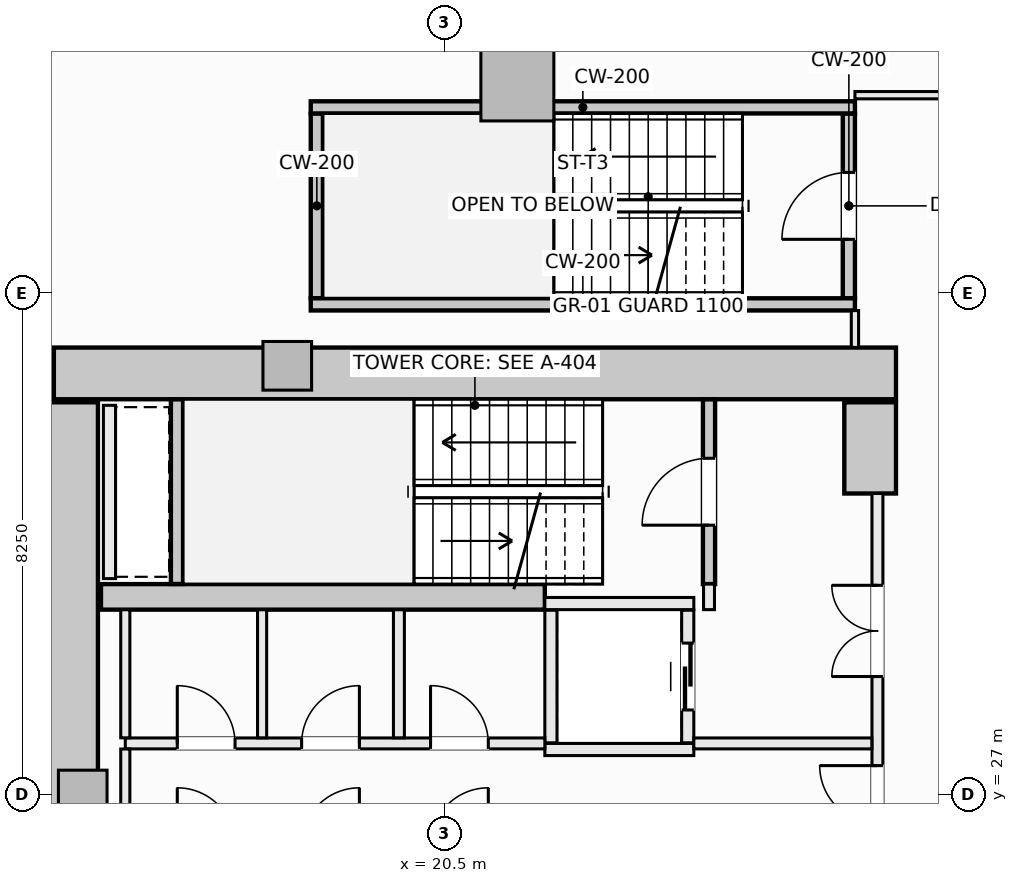
"""IFC4 building model, lengths in metres.
Left out: names, types, materials, properties, quantities, classifications, styles, units other than length and angle.
Written with IfcOpenShell. Run it as: python <this file> out.ifc"""

import sys

from ifc_helpers import new_model, si_unit, direction, frame, frame_2d, origin, origin_2d, place, context, subcontext, project, spatial, rectangle, extrude, element, fill, save


model = new_model("IFC4")
c1 = context("Model", 3, precision=1e-05, world=origin(), true_north=direction((0.0, 1.0)))
c2 = subcontext(c1, "Body", "Model", "MODEL_VIEW")
j1 = project(units=[si_unit("LENGTHUNIT", "METRE"), si_unit("PLANEANGLEUNIT", "RADIAN")], contexts=[c1])
p1 = place(None, origin())
s1 = spatial("IfcSite", under=j1, at=p1, CompositionType="ELEMENT")
p2 = place(p1, origin())
s2 = spatial("IfcBuilding", under=s1, at=p2, CompositionType="ELEMENT")
p3 = place(p2, frame((0.0, 0.0, 65.0)))
s3 = spatial("IfcBuildingStorey", under=s2, at=p3, CompositionType="ELEMENT", Elevation=65.0)
p4 = place(p3, frame((14.075, 33.925, -0.28), z_axis=(0.0, 0.0, 1.0), x_axis=(1.0, 0.0, 0.0)))
e1 = element("IfcWall", 1, at=p4, inside=s3, PredefinedType="SHEAR", context=c2, shape_type="SweptSolid", body=[
    extrude(rectangle(XDim=13.85, YDim=0.85, at=frame_2d((6.925, 0.0))), origin(), (0.0, 0.0, 1.0), 3.85),
])
p5 = place(p3, frame((14.375, 20.55, -0.28), z_axis=(0.0, 0.0, 1.0), x_axis=(0.0, 1.0, 0.0)))
e2 = element("IfcWall", 2, at=p5, inside=s3, PredefinedType="SHEAR", context=c2, shape_type="SweptSolid", body=[
    extrude(rectangle(XDim=12.9, YDim=0.85, at=frame_2d((6.45, 0.0))), origin(), (0.0, 0.0, 1.0), 3.85),
])
p6 = place(p3, frame((27.5, 31.95, -0.28), z_axis=(0.0, 0.0, 1.0), x_axis=(0.0, 1.0, 0.0)))
e3 = element("IfcWall", 3, at=p6, inside=s3, PredefinedType="SHEAR", context=c2, shape_type="SweptSolid", body=[
    extrude(rectangle(XDim=1.5, YDim=0.85, at=frame_2d((0.75, 0.0))), origin(), (0.0, 0.0, 1.0), 3.85),
])
p7 = place(p3, frame((14.85, 30.25, -0.28), z_axis=(0.0, 0.0, 1.0), x_axis=(1.0, 0.0, 0.0)))
e4 = element("IfcWall", 4, at=p7, inside=s3, PredefinedType="SHEAR", context=c2, shape_type="SweptSolid", body=[
    extrude(rectangle(XDim=7.3, YDim=0.42, at=frame_2d((3.65, 0.0))), origin(), (0.0, 0.0, 1.0), 3.85),
])
p8 = place(p3, frame((21.698, 38.677, -0.28), z_axis=(0.0, 0.0, 1.0), x_axis=(1.0, 0.0, 0.0)))
e5 = element("IfcColumn", 5, at=p8, inside=s3, PredefinedType="COLUMN", context=c2, shape_type="SweptSolid", body=[
    extrude(rectangle(XDim=1.2, YDim=1.2, at=origin_2d()), origin(), (0.0, 0.0, 1.0), 3.85),
])
for number, where, z_axis, x_axis in (
    (6, (17.914, 34.05, -0.28), (0.0, 0.0, 1.0), (1.0, 0.0, 0.0)),
    (7, (14.55, 27.0, -0.28), (0.0, 0.0, 1.0), (1.0, 0.0, 0.0)),
):
    element("IfcColumn", number, at=place(p3, frame(where, z_axis=z_axis, x_axis=x_axis)), inside=s3, PredefinedType="PILASTER", context=c2, shape_type="SweptSolid", body=[
        extrude(rectangle(XDim=0.8, YDim=0.8, at=origin_2d()), origin(), (0.0, 0.0, 1.0), 3.85),
    ])
p9 = place(p3, frame((24.85, 30.46, -0.28), z_axis=(0.0, 0.0, 1.0), x_axis=(0.0, 1.0, 0.0)))
e8 = element("IfcWall", 8, at=p9, inside=s3, PredefinedType="SHEAR", context=c2, shape_type="SweptSolid", body=[
    extrude(rectangle(XDim=3.038, YDim=0.2, at=frame_2d((1.519, 0.0))), origin(), (0.0, 0.0, 1.0), 3.85),
])
p10 = place(p9, frame((0.969, 0.0, 0.28)))
e9 = element("IfcOpeningElement", 9, at=p10, cuts=e8, PredefinedType="OPENING", context=c2, shape_type="SweptSolid", body=[
    extrude(rectangle(XDim=1.1, YDim=2.15, at=frame_2d((0.55, 1.075))), frame((0.0, 0.11, 0.0), z_axis=(0.0, -1.0, 0.0), x_axis=(1.0, 0.0, 0.0)), (0.0, 0.0, 1.0), 0.22),
])
p11 = place(p3, frame((16.1, 30.462, -0.28), z_axis=(0.0, 0.0, 1.0), x_axis=(0.0, 1.0, 0.0)))
e10 = element("IfcWall", 10, at=p11, inside=s3, PredefinedType="SHEAR", context=c2, shape_type="SweptSolid", body=[
    extrude(rectangle(XDim=3.036, YDim=0.2, at=frame_2d((1.518, 0.0))), origin(), (0.0, 0.0, 1.0), 3.85),
])
p12 = place(p3, frame((27.15, 35.16, -0.28), z_axis=(0.0, 0.0, 1.0), x_axis=(0.0, 1.0, 0.0)))
e11 = element("IfcWall", 11, at=p12, inside=s3, PredefinedType="SHEAR", context=c2, shape_type="SweptSolid", body=[
    extrude(rectangle(XDim=3.04, YDim=0.2, at=frame_2d((1.52, 0.0))), origin(), (0.0, 0.0, 1.0), 3.85),
])
p13 = place(p12, frame((0.97, 0.0, 0.28)))
e12 = element("IfcOpeningElement", 12, at=p13, cuts=e11, PredefinedType="OPENING", context=c2, shape_type="SweptSolid", body=[
    extrude(rectangle(XDim=1.1, YDim=2.15, at=frame_2d((0.55, 1.075))), frame((0.0, 0.11, 0.0), z_axis=(0.0, -1.0, 0.0), x_axis=(1.0, 0.0, 0.0)), (0.0, 0.0, 1.0), 0.22),
])
p14 = place(p3, frame((18.4, 35.16, -0.28), z_axis=(0.0, 0.0, 1.0), x_axis=(0.0, 1.0, 0.0)))
e13 = element("IfcWall", 13, at=p14, inside=s3, PredefinedType="SHEAR", context=c2, shape_type="SweptSolid", body=[
    extrude(rectangle(XDim=3.04, YDim=0.2, at=frame_2d((1.52, 0.0))), origin(), (0.0, 0.0, 1.0), 3.85),
])
for number, where, z_axis, x_axis in (
    (14, (18.3, 38.3, -0.28), (0.0, 0.0, 1.0), (1.0, 0.0, 0.0)),
    (15, (18.3, 35.06, -0.28), (0.0, 0.0, 1.0), (1.0, 0.0, 0.0)),
):
    element("IfcWall", number, at=place(p3, frame(where, z_axis=z_axis, x_axis=x_axis)), inside=s3, PredefinedType="SHEAR", context=c2, shape_type="SweptSolid", body=[
        extrude(rectangle(XDim=8.95, YDim=0.2, at=frame_2d((4.475, 0.0))), origin(), (0.0, 0.0, 1.0), 3.85),
    ])
for number, where, z_axis, x_axis in (
    (16, (22.15, 30.14, 0.0), (0.0, 0.0, 1.0), (1.0, 0.0, 0.0)),
    (17, (22.15, 27.74, 0.0), (0.0, 0.0, 1.0), (1.0, 0.0, 0.0)),
):
    element("IfcWall", number, at=place(p3, frame(where, z_axis=z_axis, x_axis=x_axis)), inside=s3, PredefinedType="SOLIDWALL", context=c2, shape_type="SweptSolid", body=[
        extrude(rectangle(XDim=2.45, YDim=0.2, at=frame_2d((1.225, 0.0))), origin(), (0.0, 0.0, 1.0), 3.57),
    ])
p15 = place(p3, frame((22.25, 27.85, 0.0), z_axis=(0.0, 0.0, 1.0), x_axis=(0.0, 1.0, 0.0)))
e18 = element("IfcWall", 18, at=p15, inside=s3, PredefinedType="SOLIDWALL", context=c2, shape_type="SweptSolid", body=[
    extrude(rectangle(XDim=2.18, YDim=0.2, at=frame_2d((1.09, 0.0))), origin(), (0.0, 0.0, 1.0), 3.57),
])
p16 = place(p3, frame((24.5, 27.85, 0.0), z_axis=(0.0, 0.0, 1.0), x_axis=(0.0, 1.0, 0.0)))
e19 = element("IfcWall", 19, at=p16, inside=s3, PredefinedType="SOLIDWALL", context=c2, shape_type="SweptSolid", body=[
    extrude(rectangle(XDim=2.18, YDim=0.2, at=frame_2d((1.09, 0.0))), origin(), (0.0, 0.0, 1.0), 3.57),
])
p17 = place(p16, frame((0.54, 0.0, 0.0)))
e20 = element("IfcOpeningElement", 20, at=p17, cuts=e19, PredefinedType="OPENING", context=c2, shape_type="SweptSolid", body=[
    extrude(rectangle(XDim=1.1, YDim=2.2, at=frame_2d((0.55, 1.1))), frame((0.0, 0.11, 0.0), z_axis=(0.0, -1.0, 0.0), x_axis=(1.0, 0.0, 0.0)), (0.0, 0.0, 1.0), 0.22),
])
p18 = place(p3, frame((14.99, 30.55, 0.0), z_axis=(0.0, 0.0, 1.0), x_axis=(0.0, 1.0, 0.0)))
e21 = element("IfcWall", 21, at=p18, inside=s3, PredefinedType="SOLIDWALL", context=c2, shape_type="SweptSolid", body=[
    extrude(rectangle(XDim=2.85, YDim=0.2, at=frame_2d((1.425, 0.0))), origin(), (0.0, 0.0, 1.0), 3.57),
])
p19 = place(p3, frame((24.85, 30.04, 0.0), z_axis=(0.0, 0.0, 1.0), x_axis=(0.0, 1.0, 0.0)))
e22 = element("IfcWall", 22, at=p19, inside=s3, PredefinedType="SOLIDWALL", context=c2, shape_type="SweptSolid", body=[
    extrude(rectangle(XDim=0.42, YDim=0.18, at=frame_2d((0.21, 0.0))), origin(), (0.0, 0.0, 1.0), 3.57),
])
p20 = place(p3, frame((27.62, 22.05, 0.0), z_axis=(0.0, 0.0, 1.0), x_axis=(0.0, 1.0, 0.0)))
e23 = element("IfcWall", 23, at=p20, inside=s3, PredefinedType="SOLIDWALL", context=c2, shape_type="SweptSolid", body=[
    extrude(rectangle(XDim=9.9, YDim=0.18, at=frame_2d((4.95, 0.0))), origin(), (0.0, 0.0, 1.0), 2.662),
])
p21 = place(p20, frame((4.475, 0.0, 0.0)))
e24 = element("IfcOpeningElement", 24, at=p21, cuts=e23, PredefinedType="OPENING", context=c2, shape_type="SweptSolid", body=[
    extrude(rectangle(XDim=0.95, YDim=2.1, at=frame_2d((0.475, 1.05))), frame((0.0, 0.1, 0.0), z_axis=(0.0, -1.0, 0.0), x_axis=(1.0, 0.0, 0.0)), (0.0, 0.0, 1.0), 0.2),
])
p22 = place(p20, frame((6.89, 0.0, 0.0)))
e25 = element("IfcOpeningElement", 25, at=p22, cuts=e23, PredefinedType="OPENING", context=c2, shape_type="SweptSolid", body=[
    extrude(rectangle(XDim=1.5, YDim=2.2, at=frame_2d((0.75, 1.1))), frame((0.0, 0.1, 0.0), z_axis=(0.0, -1.0, 0.0), x_axis=(1.0, 0.0, 0.0)), (0.0, 0.0, 1.0), 0.2),
])
p23 = place(p20, frame((1.51, 0.0, 0.0)))
e26 = element("IfcOpeningElement", 26, at=p23, cuts=e23, PredefinedType="OPENING", context=c2, shape_type="SweptSolid", body=[
    extrude(rectangle(XDim=1.5, YDim=2.2, at=frame_2d((0.75, 1.1))), frame((0.0, 0.1, 0.0), z_axis=(0.0, -1.0, 0.0), x_axis=(1.0, 0.0, 0.0)), (0.0, 0.0, 1.0), 0.2),
])
p24 = place(p3, frame((15.25, 27.84, 0.0), z_axis=(0.0, 0.0, 1.0), x_axis=(1.0, 0.0, 0.0)))
e27 = element("IfcWall", 27, at=p24, inside=s3, PredefinedType="SOLIDWALL", context=c2, shape_type="SweptSolid", body=[
    extrude(rectangle(XDim=6.9, YDim=0.18, at=frame_2d((3.45, 0.0))), origin(), (0.0, 0.0, 1.0), 3.57),
])
p25 = place(p24, frame((5.02, 0.0, 0.0)))
e28 = element("IfcOpeningElement", 28, at=p25, cuts=e27, PredefinedType="OPENING", context=c2, shape_type="SweptSolid", body=[
    extrude(rectangle(XDim=0.95, YDim=2.1, at=frame_2d((0.475, 1.05))), frame((0.0, 0.1, 0.0), z_axis=(0.0, -1.0, 0.0), x_axis=(1.0, 0.0, 0.0)), (0.0, 0.0, 1.0), 0.2),
])
p26 = place(p24, frame((0.855, 0.0, 0.0)))
e29 = element("IfcOpeningElement", 29, at=p26, cuts=e27, PredefinedType="OPENING", context=c2, shape_type="SweptSolid", body=[
    extrude(rectangle(XDim=0.95, YDim=2.1, at=frame_2d((0.475, 1.05))), frame((0.0, 0.1, 0.0), z_axis=(0.0, -1.0, 0.0), x_axis=(1.0, 0.0, 0.0)), (0.0, 0.0, 1.0), 0.2),
])
p27 = place(p24, frame((2.9, 0.0, 0.0)))
e30 = element("IfcOpeningElement", 30, at=p27, cuts=e27, PredefinedType="OPENING", context=c2, shape_type="SweptSolid", body=[
    extrude(rectangle(XDim=0.95, YDim=2.1, at=frame_2d((0.475, 1.05))), frame((0.0, 0.1, 0.0), z_axis=(0.0, -1.0, 0.0), x_axis=(1.0, 0.0, 0.0)), (0.0, 0.0, 1.0), 0.2),
])
p28 = place(p3, frame((24.6, 27.84, 0.0), z_axis=(0.0, 0.0, 1.0), x_axis=(1.0, 0.0, 0.0)))
e31 = element("IfcWall", 31, at=p28, inside=s3, PredefinedType="SOLIDWALL", context=c2, shape_type="SweptSolid", body=[
    extrude(rectangle(XDim=2.928, YDim=0.18, at=frame_2d((1.464, 0.0))), origin(), (0.0, 0.0, 1.0), 3.57),
])
p29 = place(p3, frame((15.25, 26.252, 0.0), z_axis=(0.0, 0.0, 1.0), x_axis=(0.0, 1.0, 0.0)))
e32 = element("IfcWall", 32, at=p29, inside=s3, PredefinedType="PARTITIONING", context=c2, shape_type="SweptSolid", body=[
    extrude(rectangle(XDim=1.496, YDim=0.15, at=frame_2d((0.748, 0.0))), origin(), (0.0, 0.0, 1.0), 3.57),
])
p30 = place(p3, frame((15.25, 27.932, 0.0), z_axis=(0.0, 0.0, 1.0), x_axis=(0.0, 1.0, 0.0)))
e33 = element("IfcWall", 33, at=p30, inside=s3, PredefinedType="PARTITIONING", context=c2, shape_type="SweptSolid", body=[
    extrude(rectangle(XDim=2.106, YDim=0.15, at=frame_2d((1.053, 0.0))), origin(), (0.0, 0.0, 1.0), 3.57),
])
p31 = place(p3, frame((19.75, 27.932, 0.0), z_axis=(0.0, 0.0, 1.0), x_axis=(0.0, 1.0, 0.0)))
e34 = element("IfcWall", 34, at=p31, inside=s3, PredefinedType="SOLIDWALL", context=c2, shape_type="SweptSolid", body=[
    extrude(rectangle(XDim=2.106, YDim=0.18, at=frame_2d((1.053, 0.0))), origin(), (0.0, 0.0, 1.0), 3.57),
])
p32 = place(p3, frame((17.5, 27.932, 0.0), z_axis=(0.0, 0.0, 1.0), x_axis=(0.0, 1.0, 0.0)))
e35 = element("IfcWall", 35, at=p32, inside=s3, PredefinedType="PARTITIONING", context=c2, shape_type="SweptSolid", body=[
    extrude(rectangle(XDim=2.106, YDim=0.15, at=frame_2d((1.053, 0.0))), origin(), (0.0, 0.0, 1.0), 3.57),
])
p33 = place(p3, frame((27.25, 34.352, 0.0), z_axis=(0.0, 0.0, 1.0), x_axis=(0.0, 1.0, 0.0)))
e36 = element("IfcWall", 36, at=p33, inside=s3, PredefinedType="PARTITIONING", context=c2, shape_type="SweptSolid", body=[
    extrude(rectangle(XDim=0.606, YDim=0.12, at=frame_2d((0.303, 0.0))), origin(), (0.0, 0.0, 1.0), 3.57),
])
p34 = place(p3, frame((27.25, 38.5, 0.0), z_axis=(0.0, 0.0, 1.0), x_axis=(1.0, 0.0, 0.0)))
e37 = element("IfcWall", 37, at=p34, inside=s3, PredefinedType="PARTITIONING", context=c2, shape_type="SweptSolid", body=[
    extrude(rectangle(XDim=2.53, YDim=0.12, at=frame_2d((1.265, 0.0))), origin(), (0.0, 0.0, 1.0), 3.57),
])
p35 = place(p10, origin())
e38 = element("IfcDoor", 38, at=p35, inside=s3, OperationType="SINGLE_SWING_LEFT", PredefinedType="DOOR", context=c2, shape_type="SweptSolid", body=[
    extrude(rectangle(XDim=1.1, YDim=2.15, at=frame_2d((0.55, 1.075))), frame((0.0, 0.025, 0.0), z_axis=(0.0, -1.0, 0.0), x_axis=(1.0, 0.0, 0.0)), (0.0, 0.0, 1.0), 0.05),
])
fill(e9, e38)
p36 = place(p13, origin())
e39 = element("IfcDoor", 39, at=p36, inside=s3, OperationType="SINGLE_SWING_LEFT", PredefinedType="DOOR", context=c2, shape_type="SweptSolid", body=[
    extrude(rectangle(XDim=1.1, YDim=2.15, at=frame_2d((0.55, 1.075))), frame((0.0, 0.025, 0.0), z_axis=(0.0, -1.0, 0.0), x_axis=(1.0, 0.0, 0.0)), (0.0, 0.0, 1.0), 0.05),
])
fill(e12, e39)
p37 = place(p17, origin())
e40 = element("IfcDoor", 40, at=p37, inside=s3, OperationType="SLIDING_TO_LEFT", PredefinedType="DOOR", context=c2, shape_type="SweptSolid", body=[
    extrude(rectangle(XDim=1.1, YDim=2.2, at=frame_2d((0.55, 1.1))), frame((0.0, 0.025, 0.0), z_axis=(0.0, -1.0, 0.0), x_axis=(1.0, 0.0, 0.0)), (0.0, 0.0, 1.0), 0.05),
])
fill(e20, e40)
p38 = place(p21, origin())
e41 = element("IfcDoor", 41, at=p38, inside=s3, OperationType="SINGLE_SWING_RIGHT", PredefinedType="DOOR", context=c2, shape_type="SweptSolid", body=[
    extrude(rectangle(XDim=0.95, YDim=2.1, at=frame_2d((0.475, 1.05))), frame((0.0, 0.025, 0.0), z_axis=(0.0, -1.0, 0.0), x_axis=(1.0, 0.0, 0.0)), (0.0, 0.0, 1.0), 0.05),
])
fill(e24, e41)
p39 = place(p22, origin())
e42 = element("IfcDoor", 42, at=p39, inside=s3, OperationType="DOUBLE_DOOR_SINGLE_SWING", PredefinedType="DOOR", context=c2, shape_type="SweptSolid", body=[
    extrude(rectangle(XDim=1.5, YDim=2.2, at=frame_2d((0.75, 1.1))), frame((0.0, 0.025, 0.0), z_axis=(0.0, -1.0, 0.0), x_axis=(1.0, 0.0, 0.0)), (0.0, 0.0, 1.0), 0.05),
])
fill(e25, e42)
p40 = place(p25, origin())
e43 = element("IfcDoor", 43, at=p40, inside=s3, OperationType="SINGLE_SWING_LEFT", PredefinedType="DOOR", context=c2, shape_type="SweptSolid", body=[
    extrude(rectangle(XDim=0.95, YDim=2.1, at=frame_2d((0.475, 1.05))), frame((0.0, 0.025, 0.0), z_axis=(0.0, -1.0, 0.0), x_axis=(1.0, 0.0, 0.0)), (0.0, 0.0, 1.0), 0.05),
])
fill(e28, e43)
p41 = place(p26, origin())
e44 = element("IfcDoor", 44, at=p41, inside=s3, OperationType="SINGLE_SWING_LEFT", PredefinedType="DOOR", context=c2, shape_type="SweptSolid", body=[
    extrude(rectangle(XDim=0.95, YDim=2.1, at=frame_2d((0.475, 1.05))), frame((0.0, 0.025, 0.0), z_axis=(0.0, -1.0, 0.0), x_axis=(1.0, 0.0, 0.0)), (0.0, 0.0, 1.0), 0.05),
])
fill(e29, e44)
p42 = place(p27, origin())
e45 = element("IfcDoor", 45, at=p42, inside=s3, OperationType="SINGLE_SWING_RIGHT", PredefinedType="DOOR", context=c2, shape_type="SweptSolid", body=[
    extrude(rectangle(XDim=0.95, YDim=2.1, at=frame_2d((0.475, 1.05))), frame((0.0, 0.025, 0.0), z_axis=(0.0, -1.0, 0.0), x_axis=(1.0, 0.0, 0.0)), (0.0, 0.0, 1.0), 0.05),
])
fill(e30, e45)
save(model, sys.argv[1])
